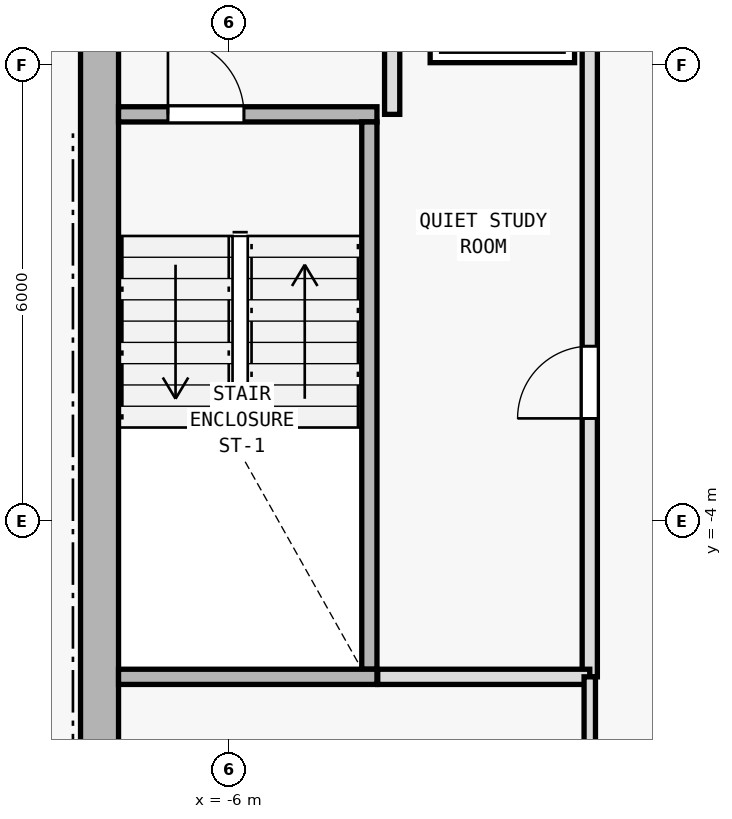
"""IFC4 building model, lengths in metres.
Left out: names, types, materials, properties, quantities, classifications, styles, units other than length and angle.
Written with IfcOpenShell. Run it as: python <this file> out.ifc"""

import sys

from ifc_helpers import new_model, si_unit, direction, frame, frame_2d, origin, origin_2d, place, context, subcontext, project, spatial, rectangle, i_section, extrude, element, fill, save


model = new_model("IFC4")
c1 = context("Model", 3, precision=1e-05, world=origin(), true_north=direction((0.0, 1.0)))
c2 = subcontext(c1, "Body", "Model", "MODEL_VIEW")
j1 = project(units=[si_unit("LENGTHUNIT", "METRE"), si_unit("PLANEANGLEUNIT", "RADIAN")], contexts=[c1])
p1 = place(None, origin())
s1 = spatial("IfcSite", under=j1, at=p1, CompositionType="ELEMENT")
p2 = place(p1, origin())
s2 = spatial("IfcBuilding", under=s1, at=p2, CompositionType="ELEMENT")
p3 = place(p2, frame((0.0, 0.0, 268.8)))
s3 = spatial("IfcBuildingStorey", under=s2, at=p3, CompositionType="ELEMENT", Elevation=268.8)
p4 = place(p3, frame((-7.7, 2.0, 0.0), z_axis=(0.0, 0.0, 1.0), x_axis=(1.0, 0.0, 0.0)))
e1 = element("IfcColumn", 1, at=p4, inside=s3, PredefinedType="COLUMN", context=c2, shape_type="SweptSolid", body=[
    extrude(i_section(OverallWidth=0.374, OverallDepth=0.372, WebThickness=0.012, FlangeThickness=0.02, FilletRadius=0.015, at=origin_2d()), origin(), (0.0, 0.0, 1.0), 3.6),
])
p5 = place(p3, frame((-7.7, -9.15, 0.0), z_axis=(0.0, 0.0, 1.0), x_axis=(0.0, 1.0, 0.0)))
e2 = element("IfcWall", 2, at=p5, inside=s3, PredefinedType="SHEAR", context=c2, shape_type="SweptSolid", body=[
    extrude(rectangle(XDim=19.1, YDim=0.5, at=frame_2d((9.55, 0.0))), origin(), (0.0, 0.0, 1.0), 3.35),
])
p6 = place(p5, frame((12.7, 0.0, 0.0)))
e3 = element("IfcOpeningElement", 3, at=p6, cuts=e2, PredefinedType="OPENING", context=c2, shape_type="SweptSolid", body=[
    extrude(rectangle(XDim=1.1, YDim=2.15, at=frame_2d((0.55, 1.075))), frame((0.0, 0.26, 0.0), z_axis=(0.0, -1.0, 0.0), x_axis=(1.0, 0.0, 0.0)), (0.0, 0.0, 1.0), 0.52),
])
p7 = place(p3, frame((-7.45, 1.35, 0.0), z_axis=(0.0, 0.0, 1.0), x_axis=(1.0, 0.0, 0.0)))
e4 = element("IfcWall", 4, at=p7, inside=s3, PredefinedType="SOLIDWALL", context=c2, shape_type="SweptSolid", body=[
    extrude(rectangle(XDim=3.4, YDim=0.2, at=frame_2d((1.7, 0.0))), origin(), (0.0, 0.0, 1.0), 3.35),
])
p8 = place(p7, frame((0.65, 0.0, 0.0)))
e5 = element("IfcOpeningElement", 5, at=p8, cuts=e4, PredefinedType="OPENING", context=c2, shape_type="SweptSolid", body=[
    extrude(rectangle(XDim=1.0, YDim=2.15, at=frame_2d((0.5, 1.075))), frame((0.0, 0.11, 0.0), z_axis=(0.0, -1.0, 0.0), x_axis=(1.0, 0.0, 0.0)), (0.0, 0.0, 1.0), 0.22),
])
p9 = place(p3, frame((-4.15, -5.95, 0.0), z_axis=(0.0, 0.0, 1.0), x_axis=(0.0, 1.0, 0.0)))
e6 = element("IfcWall", 6, at=p9, inside=s3, PredefinedType="SOLIDWALL", context=c2, shape_type="SweptSolid", body=[
    extrude(rectangle(XDim=7.2, YDim=0.2, at=frame_2d((3.6, 0.0))), origin(), (0.0, 0.0, 1.0), 3.35),
])
p10 = place(p3, frame((-3.85, 1.35, 0.0), z_axis=(0.0, 0.0, 1.0), x_axis=(0.0, 1.0, 0.0)))
e7 = element("IfcWall", 7, at=p10, inside=s3, PredefinedType="SOLIDWALL", context=c2, shape_type="SweptSolid", body=[
    extrude(rectangle(XDim=8.595, YDim=0.2, at=frame_2d((4.297, 0.0))), origin(), (0.0, 0.0, 1.0), 3.35),
])
p11 = place(p10, frame((1.5, 0.0, 0.0)))
e8 = element("IfcOpeningElement", 8, at=p11, cuts=e7, PredefinedType="OPENING", context=c2, shape_type="SweptSolid", body=[
    extrude(rectangle(XDim=1.0, YDim=2.15, at=frame_2d((0.5, 1.075))), frame((0.0, 0.11, 0.0), z_axis=(0.0, -1.0, 0.0), x_axis=(1.0, 0.0, 0.0)), (0.0, 0.0, 1.0), 0.22),
])
p12 = place(p10, frame((3.18, 0.0, 0.0)))
e9 = element("IfcOpeningElement", 9, at=p12, cuts=e7, PredefinedType="OPENING", context=c2, shape_type="SweptSolid", body=[
    extrude(rectangle(XDim=1.0, YDim=2.15, at=frame_2d((0.5, 1.075))), frame((0.0, 0.11, 0.0), z_axis=(0.0, -1.0, 0.0), x_axis=(1.0, 0.0, 0.0)), (0.0, 0.0, 1.0), 0.22),
])
p13 = place(p3, frame((-1.25, -6.05, 0.0), z_axis=(0.0, 0.0, 1.0), x_axis=(0.0, 1.0, 0.0)))
e10 = element("IfcWall", 10, at=p13, inside=s3, PredefinedType="SOLIDWALL", context=c2, shape_type="SweptSolid", body=[
    extrude(rectangle(XDim=8.7, YDim=0.2, at=frame_2d((4.35, 0.0))), origin(), (0.0, 0.0, 1.0), 3.35),
])
p14 = place(p13, frame((3.4, 0.0, 0.0)))
e11 = element("IfcOpeningElement", 11, at=p14, cuts=e10, PredefinedType="OPENING", context=c2, shape_type="SweptSolid", body=[
    extrude(rectangle(XDim=0.95, YDim=2.1, at=frame_2d((0.475, 1.05))), frame((0.0, 0.11, 0.0), z_axis=(0.0, -1.0, 0.0), x_axis=(1.0, 0.0, 0.0)), (0.0, 0.0, 1.0), 0.22),
])
p15 = place(p3, frame((-7.45, -6.05, 0.0), z_axis=(0.0, 0.0, 1.0), x_axis=(1.0, 0.0, 0.0)))
e12 = element("IfcWall", 12, at=p15, inside=s3, PredefinedType="SOLIDWALL", context=c2, shape_type="SweptSolid", body=[
    extrude(rectangle(XDim=3.4, YDim=0.2, at=frame_2d((1.7, 0.0))), origin(), (0.0, 0.0, 1.0), 3.35),
])
p16 = place(p3, frame((-4.04, -6.05, 0.0), z_axis=(0.0, 0.0, 1.0), x_axis=(1.0, 0.0, 0.0)))
e13 = element("IfcWall", 13, at=p16, inside=s3, PredefinedType="SOLIDWALL", context=c2, shape_type="SweptSolid", body=[
    extrude(rectangle(XDim=2.79, YDim=0.2, at=frame_2d((1.395, 0.0))), origin(), (0.0, 0.0, 1.0), 3.35),
])
p17 = place(p3, frame((-1.25, -9.145, 0.0), z_axis=(0.0, 0.0, 1.0), x_axis=(0.0, 1.0, 0.0)))
e14 = element("IfcWall", 14, at=p17, inside=s3, PredefinedType="PARTITIONING", context=c2, shape_type="SweptSolid", body=[
    extrude(rectangle(XDim=3.095, YDim=0.15, at=frame_2d((1.547, 0.0))), origin(), (0.0, 0.0, 1.0), 3.35),
])
p18 = place(p17, frame((0.845, 0.0, 0.0)))
e15 = element("IfcOpeningElement", 15, at=p18, cuts=e14, PredefinedType="OPENING", context=c2, shape_type="SweptSolid", body=[
    extrude(rectangle(XDim=0.95, YDim=2.1, at=frame_2d((0.475, 1.05))), frame((0.0, 0.085, 0.0), z_axis=(0.0, -1.0, 0.0), x_axis=(1.0, 0.0, 0.0)), (0.0, 0.0, 1.0), 0.17),
])
p19 = place(p8, origin())
e16 = element("IfcDoor", 16, at=p19, inside=s3, OperationType="SINGLE_SWING_LEFT", PredefinedType="DOOR", context=c2, shape_type="SweptSolid", body=[
    extrude(rectangle(XDim=1.0, YDim=2.15, at=frame_2d((0.5, 1.075))), frame((0.0, 0.025, 0.0), z_axis=(0.0, -1.0, 0.0), x_axis=(1.0, 0.0, 0.0)), (0.0, 0.0, 1.0), 0.05),
])
fill(e5, e16)
p20 = place(p14, origin())
e17 = element("IfcDoor", 17, at=p20, inside=s3, OperationType="SINGLE_SWING_LEFT", PredefinedType="DOOR", context=c2, shape_type="SweptSolid", body=[
    extrude(rectangle(XDim=0.95, YDim=2.1, at=frame_2d((0.475, 1.05))), frame((0.0, 0.025, 0.0), z_axis=(0.0, -1.0, 0.0), x_axis=(1.0, 0.0, 0.0)), (0.0, 0.0, 1.0), 0.05),
])
fill(e11, e17)
save(model, sys.argv[1])
